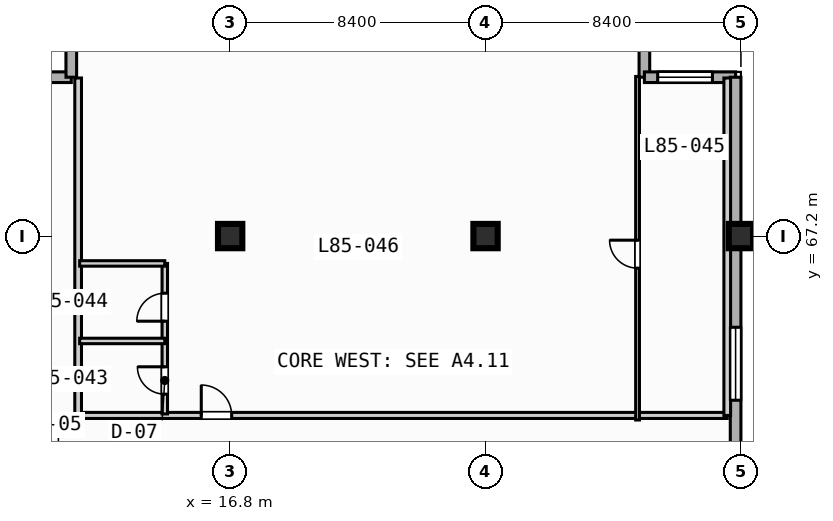
"""IFC4 building model, lengths in metres.
Left out: names, types, materials, properties, quantities, classifications, styles, units other than length and angle.
Written with IfcOpenShell. Run it as: python <this file> out.ifc"""

import sys

from ifc_helpers import new_model, si_unit, direction, frame, frame_2d, origin, origin_2d, place, context, subcontext, project, spatial, rectangle, extrude, element, fill, save


model = new_model("IFC4")
c1 = context("Model", 3, precision=1e-05, world=origin(), true_north=direction((0.0, 1.0)))
c2 = subcontext(c1, "Body", "Model", "MODEL_VIEW")
j1 = project(units=[si_unit("LENGTHUNIT", "METRE"), si_unit("PLANEANGLEUNIT", "RADIAN")], contexts=[c1])
p1 = place(None, origin())
s1 = spatial("IfcSite", under=j1, at=p1, CompositionType="ELEMENT")
p2 = place(p1, origin())
s2 = spatial("IfcBuilding", under=s1, at=p2, CompositionType="ELEMENT")
p3 = place(p2, frame((0.0, 0.0, 343.7)))
s3 = spatial("IfcBuildingStorey", under=s2, at=p3, CompositionType="ELEMENT", Elevation=343.7)
for number, where, z_axis, x_axis in (
    (1, (16.8, 67.2, 0.0), (0.0, 0.0, 1.0), (1.0, 0.0, 0.0)),
    (2, (25.2, 67.2, 0.0), (0.0, 0.0, 1.0), (1.0, 0.0, 0.0)),
    (3, (33.6, 67.2, 0.0), (0.0, 0.0, 1.0), (1.0, 0.0, 0.0)),
):
    element("IfcColumn", number, at=place(p3, frame(where, z_axis=z_axis, x_axis=x_axis)), inside=s3, PredefinedType="COLUMN", context=c2, shape_type="SweptSolid", body=[
        extrude(rectangle(XDim=0.8, YDim=0.8, at=origin_2d()), origin(), (0.0, 0.0, 1.0), 3.9),
    ])
for number, where, z_axis, x_axis in (
    (4, (8.575, 72.425, 0.0), (0.0, 0.0, 1.0), (1.0, 0.0, 0.0)),
    (5, (11.575, 72.425, 0.0), (0.0, 0.0, 1.0), (0.0, 1.0, 0.0)),
    (6, (30.425, 75.425, 0.0), (0.0, 0.0, 1.0), (0.0, -1.0, 0.0)),
):
    element("IfcWall", number, at=place(p3, frame(where, z_axis=z_axis, x_axis=x_axis)), inside=s3, PredefinedType="STANDARD", context=c2, shape_type="SweptSolid", body=[
        extrude(rectangle(XDim=3.0, YDim=0.35, at=frame_2d((1.5, 0.0))), origin(), (0.0, 0.0, 1.0), 3.67),
    ])
p4 = place(p3, frame((30.425, 72.425, 0.0), z_axis=(0.0, 0.0, 1.0), x_axis=(1.0, 0.0, 0.0)))
e7 = element("IfcWall", 7, at=p4, inside=s3, PredefinedType="STANDARD", context=c2, shape_type="SweptSolid", body=[
    extrude(rectangle(XDim=3.0, YDim=0.35, at=frame_2d((1.5, 0.0))), origin(), (0.0, 0.0, 1.0), 3.67),
])
p5 = place(p4, frame((0.438, 0.0, 0.85)))
e8 = element("IfcOpeningElement", 8, at=p5, cuts=e7, PredefinedType="OPENING", context=c2, shape_type="SweptSolid", body=[
    extrude(rectangle(XDim=1.8, YDim=1.8, at=frame_2d((0.9, 0.9))), frame((0.0, 0.185, 0.0), z_axis=(0.0, -1.0, 0.0), x_axis=(1.0, 0.0, 0.0)), (0.0, 0.0, 1.0), 0.37),
])
p6 = place(p3, frame((33.425, 72.425, 0.0), z_axis=(0.0, 0.0, 1.0), x_axis=(0.0, -1.0, 0.0)))
e9 = element("IfcWall", 9, at=p6, inside=s3, PredefinedType="STANDARD", context=c2, shape_type="SweptSolid", body=[
    extrude(rectangle(XDim=39.0, YDim=0.35, at=frame_2d((19.5, 0.0))), origin(), (0.0, 0.0, 1.0), 3.67),
])
p7 = place(p6, frame((33.725, 0.0, 0.85)))
e10 = element("IfcOpeningElement", 10, at=p7, cuts=e9, PredefinedType="OPENING", context=c2, shape_type="SweptSolid", body=[
    extrude(rectangle(XDim=1.8, YDim=1.8, at=frame_2d((0.9, 0.9))), frame((0.0, 0.185, 0.0), z_axis=(0.0, -1.0, 0.0), x_axis=(1.0, 0.0, 0.0)), (0.0, 0.0, 1.0), 0.37),
])
p8 = place(p6, frame((8.225, 0.0, 0.85)))
e11 = element("IfcOpeningElement", 11, at=p8, cuts=e9, PredefinedType="OPENING", context=c2, shape_type="SweptSolid", body=[
    extrude(rectangle(XDim=2.4, YDim=1.95, at=frame_2d((1.2, 0.975))), frame((0.0, 0.185, 0.0), z_axis=(0.0, -1.0, 0.0), x_axis=(1.0, 0.0, 0.0)), (0.0, 0.0, 1.0), 0.37),
])
p9 = place(p3, frame((11.8, 61.3, 0.0), z_axis=(0.0, 0.0, 1.0), x_axis=(1.0, 0.0, 0.0)))
e12 = element("IfcWall", 12, at=p9, inside=s3, PredefinedType="PARTITIONING", context=c2, shape_type="SweptSolid", body=[
    extrude(rectangle(XDim=21.35, YDim=0.2, at=frame_2d((10.675, 0.0))), origin(), (0.0, 0.0, 1.0), 3.67),
])
p10 = place(p9, frame((4.05, 0.0, 0.0)))
e13 = element("IfcOpeningElement", 13, at=p10, cuts=e12, PredefinedType="OPENING", context=c2, shape_type="SweptSolid", body=[
    extrude(rectangle(XDim=1.0, YDim=2.15, at=frame_2d((0.5, 1.075))), frame((0.0, 0.11, 0.0), z_axis=(0.0, -1.0, 0.0), x_axis=(1.0, 0.0, 0.0)), (0.0, 0.0, 1.0), 0.22),
])
for number, where, z_axis, x_axis in (
    (14, (33.15, 61.3, 0.0), (0.0, 0.0, 1.0), (0.0, 1.0, 0.0)),
    (15, (11.8, 61.3, 0.0), (0.0, 0.0, 1.0), (0.0, 1.0, 0.0)),
):
    element("IfcWall", number, at=place(p3, frame(where, z_axis=z_axis, x_axis=x_axis)), inside=s3, PredefinedType="PARTITIONING", context=c2, shape_type="SweptSolid", body=[
        extrude(rectangle(XDim=11.1, YDim=0.22, at=frame_2d((5.55, 0.0))), origin(), (0.0, 0.0, 1.0), 3.67),
    ])
p11 = place(p3, frame((14.65, 61.35, 0.0), z_axis=(0.0, 0.0, 1.0), x_axis=(0.0, 1.0, 0.0)))
e16 = element("IfcWall", 16, at=p11, inside=s3, PredefinedType="PLUMBINGWALL", context=c2, shape_type="SweptSolid", body=[
    extrude(rectangle(XDim=4.95, YDim=0.18, at=frame_2d((2.475, 0.0))), origin(), (0.0, 0.0, 1.0), 3.67),
])
p12 = place(p11, frame((0.65, 0.0, 0.0)))
e17 = element("IfcOpeningElement", 17, at=p12, cuts=e16, PredefinedType="OPENING", context=c2, shape_type="SweptSolid", body=[
    extrude(rectangle(XDim=0.9, YDim=2.1, at=frame_2d((0.45, 1.05))), frame((0.0, 0.1, 0.0), z_axis=(0.0, -1.0, 0.0), x_axis=(1.0, 0.0, 0.0)), (0.0, 0.0, 1.0), 0.2),
])
p13 = place(p11, frame((3.05, 0.0, 0.0)))
e18 = element("IfcOpeningElement", 18, at=p13, cuts=e16, PredefinedType="OPENING", context=c2, shape_type="SweptSolid", body=[
    extrude(rectangle(XDim=0.92, YDim=2.1, at=frame_2d((0.46, 1.05))), frame((0.0, 0.1, 0.0), z_axis=(0.0, -1.0, 0.0), x_axis=(1.0, 0.0, 0.0)), (0.0, 0.0, 1.0), 0.2),
])
for number, where, z_axis, x_axis in (
    (19, (11.85, 63.75, 0.0), (0.0, 0.0, 1.0), (1.0, 0.0, 0.0)),
    (20, (11.85, 66.3, 0.0), (0.0, 0.0, 1.0), (1.0, 0.0, 0.0)),
):
    element("IfcWall", number, at=place(p3, frame(where, z_axis=z_axis, x_axis=x_axis)), inside=s3, PredefinedType="PLUMBINGWALL", context=c2, shape_type="SweptSolid", body=[
        extrude(rectangle(XDim=2.8, YDim=0.18, at=frame_2d((1.4, 0.0))), origin(), (0.0, 0.0, 1.0), 3.67),
    ])
p14 = place(p3, frame((30.2, 61.15, 0.0), z_axis=(0.0, 0.0, 1.0), x_axis=(0.0, 1.0, 0.0)))
e21 = element("IfcWall", 21, at=p14, inside=s3, PredefinedType="PARTITIONING", context=c2, shape_type="SweptSolid", body=[
    extrude(rectangle(XDim=11.3, YDim=0.125, at=frame_2d((5.65, 0.0))), origin(), (0.0, 0.0, 1.0), 3.67),
])
p15 = place(p14, frame((4.995, 0.0, 0.0)))
e22 = element("IfcOpeningElement", 22, at=p15, cuts=e21, PredefinedType="OPENING", context=c2, shape_type="SweptSolid", body=[
    extrude(rectangle(XDim=0.92, YDim=2.1, at=frame_2d((0.46, 1.05))), frame((0.0, 0.073, 0.0), z_axis=(0.0, -1.0, 0.0), x_axis=(1.0, 0.0, 0.0)), (0.0, 0.0, 1.0), 0.145),
])
p16 = place(p5, origin())
e23 = element("IfcWindow", 23, at=p16, inside=s3, PartitioningType="SINGLE_PANEL", PredefinedType="WINDOW", context=c2, shape_type="SweptSolid", body=[
    extrude(rectangle(XDim=1.8, YDim=1.8, at=frame_2d((0.9, 0.9))), frame((0.0, 0.03, 0.0), z_axis=(0.0, -1.0, 0.0), x_axis=(1.0, 0.0, 0.0)), (0.0, 0.0, 1.0), 0.06),
])
fill(e8, e23)
p17 = place(p8, origin())
e24 = element("IfcWindow", 24, at=p17, inside=s3, PartitioningType="SINGLE_PANEL", PredefinedType="WINDOW", context=c2, shape_type="SweptSolid", body=[
    extrude(rectangle(XDim=2.4, YDim=1.95, at=frame_2d((1.2, 0.975))), frame((0.0, 0.03, 0.0), z_axis=(0.0, -1.0, 0.0), x_axis=(1.0, 0.0, 0.0)), (0.0, 0.0, 1.0), 0.06),
])
fill(e11, e24)
p18 = place(p10, origin())
e25 = element("IfcDoor", 25, at=p18, inside=s3, OperationType="SINGLE_SWING_LEFT", PredefinedType="DOOR", context=c2, shape_type="SweptSolid", body=[
    extrude(rectangle(XDim=1.0, YDim=2.15, at=frame_2d((0.5, 1.075))), frame((0.0, 0.025, 0.0), z_axis=(0.0, -1.0, 0.0), x_axis=(1.0, 0.0, 0.0)), (0.0, 0.0, 1.0), 0.05),
])
fill(e13, e25)
p19 = place(p12, origin())
e26 = element("IfcDoor", 26, at=p19, inside=s3, OperationType="SINGLE_SWING_RIGHT", PredefinedType="DOOR", context=c2, shape_type="SweptSolid", body=[
    extrude(rectangle(XDim=0.9, YDim=2.1, at=frame_2d((0.45, 1.05))), frame((0.0, 0.025, 0.0), z_axis=(0.0, -1.0, 0.0), x_axis=(1.0, 0.0, 0.0)), (0.0, 0.0, 1.0), 0.05),
])
fill(e17, e26)
p20 = place(p13, origin())
e27 = element("IfcDoor", 27, at=p20, inside=s3, OperationType="SINGLE_SWING_LEFT", PredefinedType="DOOR", context=c2, shape_type="SweptSolid", body=[
    extrude(rectangle(XDim=0.92, YDim=2.1, at=frame_2d((0.46, 1.05))), frame((0.0, 0.025, 0.0), z_axis=(0.0, -1.0, 0.0), x_axis=(1.0, 0.0, 0.0)), (0.0, 0.0, 1.0), 0.05),
])
fill(e18, e27)
p21 = place(p15, origin())
e28 = element("IfcDoor", 28, at=p21, inside=s3, OperationType="SINGLE_SWING_RIGHT", PredefinedType="DOOR", context=c2, shape_type="SweptSolid", body=[
    extrude(rectangle(XDim=0.92, YDim=2.1, at=frame_2d((0.46, 1.05))), frame((0.0, 0.025, 0.0), z_axis=(0.0, -1.0, 0.0), x_axis=(1.0, 0.0, 0.0)), (0.0, 0.0, 1.0), 0.05),
])
fill(e22, e28)
save(model, sys.argv[1])
